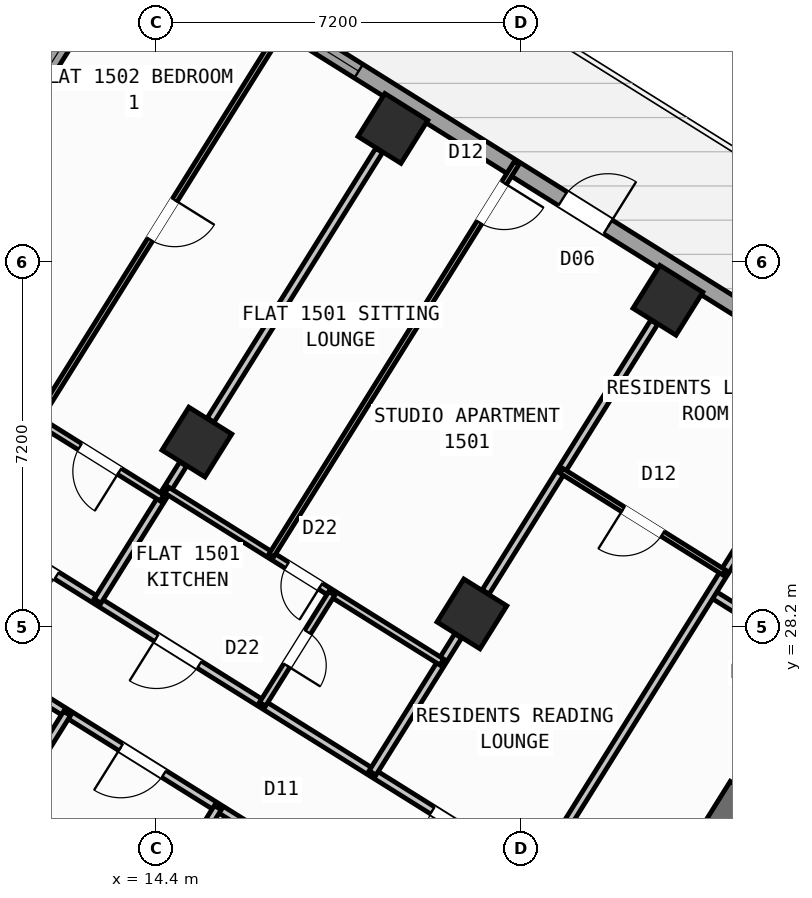
"""IFC4 building model, lengths in metres.
Left out: names, types, materials, properties, quantities, classifications, styles, units other than length and angle.
Written with IfcOpenShell. Run it as: python <this file> out.ifc"""

import sys

from ifc_helpers import new_model, si_unit, direction, frame, frame_2d, origin, origin_2d, place, context, subcontext, project, spatial, rectangle, hollow_rectangle, extrude, source, transform, mapped, element, fill, save


model = new_model("IFC4")
c1 = context("Model", 3, precision=1e-05, world=origin(), true_north=direction((0.0, 1.0)))
c2 = subcontext(c1, "Body", "Model", "MODEL_VIEW")
j1 = project(units=[si_unit("LENGTHUNIT", "METRE"), si_unit("PLANEANGLEUNIT", "RADIAN")], contexts=[c1])
p1 = place(None, origin())
s1 = spatial("IfcSite", under=j1, at=p1, CompositionType="ELEMENT")
p2 = place(p1, origin())
s2 = spatial("IfcBuilding", under=s1, at=p2, CompositionType="ELEMENT")
p3 = place(p2, frame((0.0, 0.0, 60.0)))
s3 = spatial("IfcBuildingStorey", under=s2, at=p3, CompositionType="ELEMENT", Elevation=60.0)
p4 = place(p3, frame((26.007, 24.976, 0.0), z_axis=(0.0, 0.0, 1.0), x_axis=(-0.529916319127, -0.848049936456, 0.0)))
e1 = element("IfcWall", 1, at=p4, inside=s3, PredefinedType="SHEAR", context=c2, shape_type="SweptSolid", body=[
    extrude(rectangle(XDim=6.375, YDim=0.65, at=frame_2d((3.188, 0.0))), origin(), (0.0, 0.0, 1.0), 3.35),
])
m1 = source(origin(), c2, "Body", "SweptSolid", [
    extrude(hollow_rectangle(XDim=1.0, YDim=1.0, WallThickness=0.04, at=origin_2d()), origin(), (0.0, 0.0, 1.0), 3.6),
])
for number, where, z_axis, x_axis in (
    (2, (24.5, 34.643, 0.0), (0.0, 0.0, 1.0), (-0.848, 0.53, 0.0)),
    (3, (20.632, 28.452, 0.0), (0.0, 0.0, 1.0), (-0.848, 0.53, 0.0)),
    (4, (19.073, 38.034, 0.0), (0.0, 0.0, 1.0), (-0.848, 0.53, 0.0)),
    (5, (15.205, 31.844, 0.0), (0.0, 0.0, 1.0), (-0.848, 0.53, 0.0)),
):
    element("IfcColumn", number, at=place(p3, frame(where, z_axis=z_axis, x_axis=x_axis)), inside=s3, PredefinedType="COLUMN", context=c2, shape_type="MappedRepresentation", body=[
        mapped(m1, transform((0.0, 0.0, 0.0), scale=1.0)),
    ])
p5 = place(p3, frame((2.415, 23.452, 0.0), z_axis=(0.0, 0.0, 1.0), x_axis=(0.52991049553, 0.848053575387, 0.0)))
e6 = element("IfcWall", 6, at=p5, inside=s3, PredefinedType="STANDARD", context=c2, shape_type="SweptSolid", body=[
    extrude(rectangle(XDim=21.587, YDim=0.32, at=frame_2d((10.794, 0.0))), origin(), (0.0, 0.0, 1.0), 2.725),
])
p6 = place(p5, frame((2.356, 0.0, 0.8)))
e7 = element("IfcOpeningElement", 7, at=p6, cuts=e6, PredefinedType="OPENING", context=c2, shape_type="SweptSolid", body=[
    extrude(rectangle(XDim=2.1, YDim=1.55, at=frame_2d((1.05, 0.775))), frame((0.0, 0.17, 0.0), z_axis=(0.0, -1.0, 0.0), x_axis=(1.0, 0.0, 0.0)), (0.0, 0.0, 1.0), 0.34),
])
p7 = place(p5, frame((10.949, 0.0, 1.0)))
e8 = element("IfcOpeningElement", 8, at=p7, cuts=e6, PredefinedType="OPENING", context=c2, shape_type="SweptSolid", body=[
    extrude(rectangle(XDim=0.9, YDim=1.25, at=frame_2d((0.45, 0.625))), frame((0.0, 0.17, 0.0), z_axis=(0.0, -1.0, 0.0), x_axis=(1.0, 0.0, 0.0)), (0.0, 0.0, 1.0), 0.34),
])
p8 = place(p5, frame((15.394, 0.0, 0.85)))
e9 = element("IfcOpeningElement", 9, at=p8, cuts=e6, PredefinedType="OPENING", context=c2, shape_type="SweptSolid", body=[
    extrude(rectangle(XDim=1.5, YDim=1.5, at=frame_2d((0.75, 0.75))), frame((0.0, 0.17, 0.0), z_axis=(0.0, -1.0, 0.0), x_axis=(1.0, 0.0, 0.0)), (0.0, 0.0, 1.0), 0.34),
])
p9 = place(p5, frame((18.194, 0.0, 0.85)))
e10 = element("IfcOpeningElement", 10, at=p9, cuts=e6, PredefinedType="OPENING", context=c2, shape_type="SweptSolid", body=[
    extrude(rectangle(XDim=1.5, YDim=1.5, at=frame_2d((0.75, 0.75))), frame((0.0, 0.17, 0.0), z_axis=(0.0, -1.0, 0.0), x_axis=(1.0, 0.0, 0.0)), (0.0, 0.0, 1.0), 0.34),
])
p10 = place(p3, frame((14.138, 41.825, 0.0), z_axis=(0.0, 0.0, 1.0), x_axis=(0.848046498049, -0.529921821731, 0.0)))
e11 = element("IfcWall", 11, at=p10, inside=s3, PredefinedType="STANDARD", context=c2, shape_type="SweptSolid", body=[
    extrude(rectangle(XDim=31.588, YDim=0.32, at=frame_2d((15.794, 0.0))), origin(), (0.0, 0.0, 1.0), 3.35),
])
p11 = place(p10, frame((9.772, 0.0, 0.0)))
e12 = element("IfcOpeningElement", 12, at=p11, cuts=e11, PredefinedType="OPENING", context=c2, shape_type="SweptSolid", body=[
    extrude(rectangle(XDim=1.05, YDim=2.15, at=frame_2d((0.525, 1.075))), frame((0.0, 0.17, 0.0), z_axis=(0.0, -1.0, 0.0), x_axis=(1.0, 0.0, 0.0)), (0.0, 0.0, 1.0), 0.34),
])
p12 = place(p10, frame((0.966, 0.0, 0.85)))
e13 = element("IfcOpeningElement", 13, at=p12, cuts=e11, PredefinedType="OPENING", context=c2, shape_type="SweptSolid", body=[
    extrude(rectangle(XDim=1.5, YDim=1.5, at=frame_2d((0.75, 0.75))), frame((0.0, 0.17, 0.0), z_axis=(0.0, -1.0, 0.0), x_axis=(1.0, 0.0, 0.0)), (0.0, 0.0, 1.0), 0.34),
])
p13 = place(p10, frame((4.121, 0.0, 1.0)))
e14 = element("IfcOpeningElement", 14, at=p13, cuts=e11, PredefinedType="OPENING", context=c2, shape_type="SweptSolid", body=[
    extrude(rectangle(XDim=0.9, YDim=1.25, at=frame_2d((0.45, 0.625))), frame((0.0, 0.17, 0.0), z_axis=(0.0, -1.0, 0.0), x_axis=(1.0, 0.0, 0.0)), (0.0, 0.0, 1.0), 0.34),
])
p14 = place(p10, frame((13.899, 0.0, 0.85)))
e15 = element("IfcOpeningElement", 15, at=p14, cuts=e11, PredefinedType="OPENING", context=c2, shape_type="SweptSolid", body=[
    extrude(rectangle(XDim=1.5, YDim=1.5, at=frame_2d((0.75, 0.75))), frame((0.0, 0.17, 0.0), z_axis=(0.0, -1.0, 0.0), x_axis=(1.0, 0.0, 0.0)), (0.0, 0.0, 1.0), 0.34),
])
p15 = place(p10, frame((22.019, 0.0, 0.95)))
e16 = element("IfcOpeningElement", 16, at=p15, cuts=e11, PredefinedType="OPENING", context=c2, shape_type="SweptSolid", body=[
    extrude(rectangle(XDim=1.2, YDim=1.4, at=frame_2d((0.6, 0.7))), frame((0.0, 0.17, 0.0), z_axis=(0.0, -1.0, 0.0), x_axis=(1.0, 0.0, 0.0)), (0.0, 0.0, 1.0), 0.34),
])
p16 = place(p10, frame((27.569, 0.0, 0.95)))
e17 = element("IfcOpeningElement", 17, at=p16, cuts=e11, PredefinedType="OPENING", context=c2, shape_type="SweptSolid", body=[
    extrude(rectangle(XDim=1.2, YDim=1.4, at=frame_2d((0.6, 0.7))), frame((0.0, 0.17, 0.0), z_axis=(0.0, -1.0, 0.0), x_axis=(1.0, 0.0, 0.0)), (0.0, 0.0, 1.0), 0.34),
])
p17 = place(p3, frame((27.57, 27.478, 0.0), z_axis=(0.0, 0.0, 1.0), x_axis=(-0.848050851465, 0.529914854792, 0.0)))
e18 = element("IfcWall", 18, at=p17, inside=s3, PredefinedType="PARTITIONING", context=c2, shape_type="SweptSolid", body=[
    extrude(rectangle(XDim=2.61, YDim=0.16, at=frame_2d((1.305, 0.0))), origin(), (0.0, 0.0, 1.0), 3.34),
])
p18 = place(p17, frame((0.95, 0.0, 0.0)))
e19 = element("IfcOpeningElement", 19, at=p18, cuts=e18, PredefinedType="OPENING", context=c2, shape_type="SweptSolid", body=[
    extrude(rectangle(XDim=0.86, YDim=2.05, at=frame_2d((0.43, 1.025))), frame((0.0, 0.09, 0.0), z_axis=(0.0, -1.0, 0.0), x_axis=(1.0, 0.0, 0.0)), (0.0, 0.0, 1.0), 0.18),
])
p19 = place(p3, frame((27.953, 33.016, 0.0), z_axis=(0.0, 0.0, 1.0), x_axis=(-0.529905022231, -0.848056995381, 0.0)))
e20 = element("IfcWall", 20, at=p19, inside=s3, PredefinedType="PARTITIONING", context=c2, shape_type="SweptSolid", body=[
    extrude(rectangle(XDim=11.45, YDim=0.16, at=frame_2d((5.725, 0.0))), origin(), (0.0, 0.0, 1.0), 3.34),
])
p20 = place(p3, frame((21.885, 23.306, 0.0), z_axis=(0.0, 0.0, 1.0), x_axis=(-0.848052408131, 0.529912363569, 0.0)))
e21 = element("IfcWall", 21, at=p20, inside=s3, PredefinedType="PARTITIONING", context=c2, shape_type="SweptSolid", body=[
    extrude(rectangle(XDim=16.73, YDim=0.16, at=frame_2d((8.365, 0.0))), origin(), (0.0, 0.0, 1.0), 3.34),
])
p21 = place(p20, frame((1.395, 0.0, 0.0)))
e22 = element("IfcOpeningElement", 22, at=p21, cuts=e21, PredefinedType="OPENING", context=c2, shape_type="SweptSolid", body=[
    extrude(rectangle(XDim=1.0, YDim=2.1, at=frame_2d((0.5, 1.05))), frame((0.0, 0.09, 0.0), z_axis=(0.0, -1.0, 0.0), x_axis=(1.0, 0.0, 0.0)), (0.0, 0.0, 1.0), 0.18),
])
p22 = place(p20, frame((7.82, 0.0, 0.0)))
e23 = element("IfcOpeningElement", 23, at=p22, cuts=e21, PredefinedType="OPENING", context=c2, shape_type="SweptSolid", body=[
    extrude(rectangle(XDim=1.0, YDim=2.1, at=frame_2d((0.5, 1.05))), frame((0.0, 0.09, 0.0), z_axis=(0.0, -1.0, 0.0), x_axis=(1.0, 0.0, 0.0)), (0.0, 0.0, 1.0), 0.18),
])
p23 = place(p20, frame((11.14, 0.0, 0.0)))
e24 = element("IfcOpeningElement", 24, at=p23, cuts=e21, PredefinedType="OPENING", context=c2, shape_type="SweptSolid", body=[
    extrude(rectangle(XDim=1.0, YDim=2.1, at=frame_2d((0.5, 1.05))), frame((0.0, 0.09, 0.0), z_axis=(0.0, -1.0, 0.0), x_axis=(1.0, 0.0, 0.0)), (0.0, 0.0, 1.0), 0.18),
])
p24 = place(p3, frame((20.719, 21.44, 0.0), z_axis=(0.0, 0.0, 1.0), x_axis=(-0.848048310262, 0.529918921593, 0.0)))
e25 = element("IfcWall", 25, at=p24, inside=s3, PredefinedType="PARTITIONING", context=c2, shape_type="SweptSolid", body=[
    extrude(rectangle(XDim=16.73, YDim=0.16, at=frame_2d((8.365, 0.0))), origin(), (0.0, 0.0, 1.0), 3.34),
])
p25 = place(p24, frame((0.92, 0.0, 0.0)))
e26 = element("IfcOpeningElement", 26, at=p25, cuts=e25, PredefinedType="OPENING", context=c2, shape_type="SweptSolid", body=[
    extrude(rectangle(XDim=1.0, YDim=2.1, at=frame_2d((0.5, 1.05))), frame((0.0, 0.09, 0.0), z_axis=(0.0, -1.0, 0.0), x_axis=(1.0, 0.0, 0.0)), (0.0, 0.0, 1.0), 0.18),
])
p26 = place(p24, frame((4.408, 0.0, 0.0)))
e27 = element("IfcOpeningElement", 27, at=p26, cuts=e25, PredefinedType="OPENING", context=c2, shape_type="SweptSolid", body=[
    extrude(rectangle(XDim=1.0, YDim=2.1, at=frame_2d((0.5, 1.05))), frame((0.0, 0.09, 0.0), z_axis=(0.0, -1.0, 0.0), x_axis=(1.0, 0.0, 0.0)), (0.0, 0.0, 1.0), 0.18),
])
p27 = place(p24, frame((7.271, 0.0, 0.0)))
e28 = element("IfcOpeningElement", 28, at=p27, cuts=e25, PredefinedType="OPENING", context=c2, shape_type="SweptSolid", body=[
    extrude(rectangle(XDim=1.0, YDim=2.1, at=frame_2d((0.5, 1.05))), frame((0.0, 0.09, 0.0), z_axis=(0.0, -1.0, 0.0), x_axis=(1.0, 0.0, 0.0)), (0.0, 0.0, 1.0), 0.18),
])
p28 = place(p24, frame((10.78, 0.0, 0.0)))
e29 = element("IfcOpeningElement", 29, at=p28, cuts=e25, PredefinedType="OPENING", context=c2, shape_type="SweptSolid", body=[
    extrude(rectangle(XDim=1.0, YDim=2.1, at=frame_2d((0.5, 1.05))), frame((0.0, 0.09, 0.0), z_axis=(0.0, -1.0, 0.0), x_axis=(1.0, 0.0, 0.0)), (0.0, 0.0, 1.0), 0.18),
])
p29 = place(p24, frame((14.372, 0.0, 0.0)))
e30 = element("IfcOpeningElement", 30, at=p29, cuts=e25, PredefinedType="OPENING", context=c2, shape_type="SweptSolid", body=[
    extrude(rectangle(XDim=1.0, YDim=2.1, at=frame_2d((0.5, 1.05))), frame((0.0, 0.09, 0.0), z_axis=(0.0, -1.0, 0.0), x_axis=(1.0, 0.0, 0.0)), (0.0, 0.0, 1.0), 0.18),
])
p30 = place(p3, frame((15.618, 24.628, 0.0), z_axis=(0.0, 0.0, 1.0), x_axis=(-0.529928058306, -0.848042600947, 0.0)))
e31 = element("IfcWall", 31, at=p30, inside=s3, PredefinedType="PARTITIONING", context=c2, shape_type="SweptSolid", body=[
    extrude(rectangle(XDim=8.05, YDim=0.16, at=frame_2d((4.025, 0.0))), origin(), (0.0, 0.0, 1.0), 2.995),
])
p31 = place(p3, frame((12.642, 26.488, 0.0), z_axis=(0.0, 0.0, 1.0), x_axis=(-0.529914428959, -0.848051117552, 0.0)))
e32 = element("IfcWall", 32, at=p31, inside=s3, PredefinedType="PARTITIONING", context=c2, shape_type="SweptSolid", body=[
    extrude(rectangle(XDim=8.05, YDim=0.16, at=frame_2d((4.025, 0.0))), origin(), (0.0, 0.0, 1.0), 3.34),
])
p32 = place(p3, frame((24.229, 34.209, 0.0), z_axis=(0.0, 0.0, 1.0), x_axis=(-0.529897533635, -0.848061674554, 0.0)))
e33 = element("IfcWall", 33, at=p32, inside=s3, PredefinedType="PARTITIONING", context=c2, shape_type="SweptSolid", body=[
    extrude(rectangle(XDim=6.276, YDim=0.16, at=frame_2d((3.138, 0.0))), origin(), (0.0, 0.0, 1.0), 2.725),
])
p33 = place(p3, frame((20.361, 28.018, 0.0), z_axis=(0.0, 0.0, 1.0), x_axis=(-0.529875025416, -0.848075738033, 0.0)))
e34 = element("IfcWall", 34, at=p33, inside=s3, PredefinedType="PARTITIONING", context=c2, shape_type="SweptSolid", body=[
    extrude(rectangle(XDim=3.188, YDim=0.16, at=frame_2d((1.594, 0.0))), origin(), (0.0, 0.0, 1.0), 2.725),
])
p34 = place(p3, frame((25.612, 29.269, 0.0), z_axis=(0.0, 0.0, 1.0), x_axis=(-0.84803087207, 0.529946827537, 0.0)))
e35 = element("IfcWall", 35, at=p34, inside=s3, PredefinedType="PARTITIONING", context=c2, shape_type="SweptSolid", body=[
    extrude(rectangle(XDim=3.79, YDim=0.11, at=frame_2d((1.895, 0.0))), origin(), (0.0, 0.0, 1.0), 3.34),
])
p35 = place(p34, frame((1.435, 0.0, 0.0)))
e36 = element("IfcOpeningElement", 36, at=p35, cuts=e35, PredefinedType="OPENING", context=c2, shape_type="SweptSolid", body=[
    extrude(rectangle(XDim=0.92, YDim=2.08, at=frame_2d((0.46, 1.04))), frame((0.0, 0.065, 0.0), z_axis=(0.0, -1.0, 0.0), x_axis=(1.0, 0.0, 0.0)), (0.0, 0.0, 1.0), 0.13),
])
p36 = place(p3, frame((18.802, 37.6, 0.0), z_axis=(0.0, 0.0, 1.0), x_axis=(-0.529915015264, -0.848050751193, 0.0)))
e37 = element("IfcWall", 37, at=p36, inside=s3, PredefinedType="PARTITIONING", context=c2, shape_type="SweptSolid", body=[
    extrude(rectangle(XDim=6.276, YDim=0.16, at=frame_2d((3.138, 0.0))), origin(), (0.0, 0.0, 1.0), 2.725),
])
p37 = place(p3, frame((14.933, 31.409, 0.0), z_axis=(0.0, 0.0, 1.0), x_axis=(-0.529875025416, -0.848075738033, 0.0)))
e38 = element("IfcWall", 38, at=p37, inside=s3, PredefinedType="PARTITIONING", context=c2, shape_type="SweptSolid", body=[
    extrude(rectangle(XDim=3.188, YDim=0.16, at=frame_2d((1.594, 0.0))), origin(), (0.0, 0.0, 1.0), 2.725),
])
p38 = place(p3, frame((20.039, 27.502, 0.0), z_axis=(0.0, 0.0, 1.0), x_axis=(-0.848039019877, 0.529933789039, 0.0)))
e39 = element("IfcWall", 39, at=p38, inside=s3, PredefinedType="PLUMBINGWALL", context=c2, shape_type="SweptSolid", body=[
    extrude(rectangle(XDim=6.4, YDim=0.14, at=frame_2d((3.2, 0.0))), origin(), (0.0, 0.0, 1.0), 3.34),
])
p39 = place(p38, frame((2.824, 0.0, 0.0)))
e40 = element("IfcOpeningElement", 40, at=p39, cuts=e39, PredefinedType="OPENING", context=c2, shape_type="SweptSolid", body=[
    extrude(rectangle(XDim=0.78, YDim=2.05, at=frame_2d((0.39, 1.025))), frame((0.0, 0.08, 0.0), z_axis=(0.0, -1.0, 0.0), x_axis=(1.0, 0.0, 0.0)), (0.0, 0.0, 1.0), 0.16),
])
p40 = place(p3, frame((17.867, 28.859, 0.0), z_axis=(0.0, 0.0, 1.0), x_axis=(-0.529913878929, -0.848051461244, 0.0)))
e41 = element("IfcWall", 41, at=p40, inside=s3, PredefinedType="PLUMBINGWALL", context=c2, shape_type="SweptSolid", body=[
    extrude(rectangle(XDim=2.58, YDim=0.14, at=frame_2d((1.29, 0.0))), origin(), (0.0, 0.0, 1.0), 3.34),
])
p41 = place(p40, frame((0.9, 0.0, 0.0)))
e42 = element("IfcOpeningElement", 42, at=p41, cuts=e41, PredefinedType="OPENING", context=c2, shape_type="SweptSolid", body=[
    extrude(rectangle(XDim=0.78, YDim=2.05, at=frame_2d((0.39, 1.025))), frame((0.0, 0.08, 0.0), z_axis=(0.0, -1.0, 0.0), x_axis=(1.0, 0.0, 0.0)), (0.0, 0.0, 1.0), 0.16),
])
p42 = place(p3, frame((21.517, 37.356, 0.0), z_axis=(0.0, 0.0, 1.0), x_axis=(-0.529919705034, -0.848047820713, 0.0)))
e43 = element("IfcWall", 43, at=p42, inside=s3, PredefinedType="PARTITIONING", context=c2, shape_type="SweptSolid", body=[
    extrude(rectangle(XDim=9.14, YDim=0.11, at=frame_2d((4.57, 0.0))), origin(), (0.0, 0.0, 1.0), 3.34),
])
p43 = place(p42, frame((0.47, 0.0, 0.0)))
e44 = element("IfcOpeningElement", 44, at=p43, cuts=e43, PredefinedType="OPENING", context=c2, shape_type="SweptSolid", body=[
    extrude(rectangle(XDim=0.92, YDim=2.08, at=frame_2d((0.46, 1.04))), frame((0.0, 0.065, 0.0), z_axis=(0.0, -1.0, 0.0), x_axis=(1.0, 0.0, 0.0)), (0.0, 0.0, 1.0), 0.13),
])
p44 = place(p3, frame((16.995, 40.182, 0.0), z_axis=(0.0, 0.0, 1.0), x_axis=(-0.529927783988, -0.848042772363, 0.0)))
e45 = element("IfcWall", 45, at=p44, inside=s3, PredefinedType="PARTITIONING", context=c2, shape_type="SweptSolid", body=[
    extrude(rectangle(XDim=11.72, YDim=0.11, at=frame_2d((5.86, 0.0))), origin(), (0.0, 0.0, 1.0), 3.34),
])
p45 = place(p44, frame((10.08, 0.0, 0.0)))
e46 = element("IfcOpeningElement", 46, at=p45, cuts=e45, PredefinedType="OPENING", context=c2, shape_type="SweptSolid", body=[
    extrude(rectangle(XDim=0.78, YDim=2.05, at=frame_2d((0.39, 1.025))), frame((0.0, 0.065, 0.0), z_axis=(0.0, -1.0, 0.0), x_axis=(1.0, 0.0, 0.0)), (0.0, 0.0, 1.0), 0.13),
])
p46 = place(p44, frame((4.2, 0.0, 0.0)))
e47 = element("IfcOpeningElement", 47, at=p46, cuts=e45, PredefinedType="OPENING", context=c2, shape_type="SweptSolid", body=[
    extrude(rectangle(XDim=0.92, YDim=2.08, at=frame_2d((0.46, 1.04))), frame((0.0, 0.065, 0.0), z_axis=(0.0, -1.0, 0.0), x_axis=(1.0, 0.0, 0.0)), (0.0, 0.0, 1.0), 0.13),
])
p47 = place(p3, frame((14.516, 30.741, 0.0), z_axis=(0.0, 0.0, 1.0), x_axis=(-0.848059786386, 0.529900555496, 0.0)))
e48 = element("IfcWall", 48, at=p47, inside=s3, PredefinedType="PLUMBINGWALL", context=c2, shape_type="SweptSolid", body=[
    extrude(rectangle(XDim=2.9, YDim=0.14, at=frame_2d((1.45, 0.0))), origin(), (0.0, 0.0, 1.0), 3.34),
])
p48 = place(p47, frame((0.99, 0.0, 0.0)))
e49 = element("IfcOpeningElement", 49, at=p48, cuts=e48, PredefinedType="OPENING", context=c2, shape_type="SweptSolid", body=[
    extrude(rectangle(XDim=0.92, YDim=2.08, at=frame_2d((0.46, 1.04))), frame((0.0, 0.08, 0.0), z_axis=(0.0, -1.0, 0.0), x_axis=(1.0, 0.0, 0.0)), (0.0, 0.0, 1.0), 0.16),
])
m2 = source(origin(), c2, "Body", "SweptSolid", [
    extrude(rectangle(XDim=1.05, YDim=2.15, at=frame_2d((0.525, 1.075))), frame((0.0, 0.025, 0.0), z_axis=(0.0, -1.0, 0.0), x_axis=(1.0, 0.0, 0.0)), (0.0, 0.0, 1.0), 0.05),
])
p49 = place(p11, origin())
e50 = element("IfcDoor", 50, at=p49, inside=s3, OperationType="SINGLE_SWING_RIGHT", PredefinedType="DOOR", context=c2, shape_type="MappedRepresentation", body=[
    mapped(m2, transform((0.0, 0.0, 0.0), scale=1.0)),
])
fill(e12, e50)
m3 = source(origin(), c2, "Body", "SweptSolid", [
    extrude(rectangle(XDim=1.5, YDim=1.5, at=frame_2d((0.75, 0.75))), frame((0.0, 0.03, 0.0), z_axis=(0.0, -1.0, 0.0), x_axis=(1.0, 0.0, 0.0)), (0.0, 0.0, 1.0), 0.06),
])
p50 = place(p9, origin())
e51 = element("IfcWindow", 51, at=p50, inside=s3, PartitioningType="SINGLE_PANEL", PredefinedType="WINDOW", context=c2, shape_type="MappedRepresentation", body=[
    mapped(m3, transform((0.0, 0.0, 0.0), scale=1.0)),
])
fill(e10, e51)
m4 = source(origin(), c2, "Body", "SweptSolid", [
    extrude(rectangle(XDim=0.9, YDim=1.25, at=frame_2d((0.45, 0.625))), frame((0.0, 0.03, 0.0), z_axis=(0.0, -1.0, 0.0), x_axis=(1.0, 0.0, 0.0)), (0.0, 0.0, 1.0), 0.06),
])
p51 = place(p13, origin())
e52 = element("IfcWindow", 52, at=p51, inside=s3, PartitioningType="SINGLE_PANEL", PredefinedType="WINDOW", context=c2, shape_type="MappedRepresentation", body=[
    mapped(m4, transform((0.0, 0.0, 0.0), scale=1.0)),
])
fill(e14, e52)
m5 = source(origin(), c2, "Body", "SweptSolid", [
    extrude(rectangle(XDim=1.0, YDim=2.1, at=frame_2d((0.5, 1.05))), frame((0.0, 0.025, 0.0), z_axis=(0.0, -1.0, 0.0), x_axis=(1.0, 0.0, 0.0)), (0.0, 0.0, 1.0), 0.05),
])
p52 = place(p27, origin())
e53 = element("IfcDoor", 53, at=p52, inside=s3, OperationType="SINGLE_SWING_RIGHT", PredefinedType="DOOR", context=c2, shape_type="MappedRepresentation", body=[
    mapped(m5, transform((0.0, 0.0, 0.0), scale=1.0)),
])
fill(e28, e53)
p53 = place(p21, origin())
e54 = element("IfcDoor", 54, at=p53, inside=s3, OperationType="SINGLE_SWING_LEFT", PredefinedType="DOOR", context=c2, shape_type="MappedRepresentation", body=[
    mapped(m5, transform((0.0, 0.0, 0.0), scale=1.0)),
])
fill(e22, e54)
m6 = source(origin(), c2, "Body", "SweptSolid", [
    extrude(rectangle(XDim=0.92, YDim=2.08, at=frame_2d((0.46, 1.04))), frame((0.0, 0.025, 0.0), z_axis=(0.0, -1.0, 0.0), x_axis=(1.0, 0.0, 0.0)), (0.0, 0.0, 1.0), 0.05),
])
p54 = place(p35, origin())
e55 = element("IfcDoor", 55, at=p54, inside=s3, OperationType="SINGLE_SWING_RIGHT", PredefinedType="DOOR", context=c2, shape_type="MappedRepresentation", body=[
    mapped(m6, transform((0.0, 0.0, 0.0), scale=1.0)),
])
fill(e36, e55)
p55 = place(p43, origin())
e56 = element("IfcDoor", 56, at=p55, inside=s3, OperationType="SINGLE_SWING_LEFT", PredefinedType="DOOR", context=c2, shape_type="MappedRepresentation", body=[
    mapped(m6, transform((0.0, 0.0, 0.0), scale=1.0)),
])
fill(e44, e56)
p56 = place(p22, origin())
e57 = element("IfcDoor", 57, at=p56, inside=s3, OperationType="SINGLE_SWING_RIGHT", PredefinedType="DOOR", context=c2, shape_type="MappedRepresentation", body=[
    mapped(m5, transform((0.0, 0.0, 0.0), scale=1.0)),
])
fill(e23, e57)
m7 = source(origin(), c2, "Body", "SweptSolid", [
    extrude(rectangle(XDim=0.78, YDim=2.05, at=frame_2d((0.39, 1.025))), frame((0.0, 0.025, 0.0), z_axis=(0.0, -1.0, 0.0), x_axis=(1.0, 0.0, 0.0)), (0.0, 0.0, 1.0), 0.05),
])
p57 = place(p39, origin())
e58 = element("IfcDoor", 58, at=p57, inside=s3, OperationType="SINGLE_SWING_LEFT", PredefinedType="DOOR", context=c2, shape_type="MappedRepresentation", body=[
    mapped(m7, transform((0.0, 0.0, 0.0), scale=1.0)),
])
fill(e40, e58)
p58 = place(p41, origin())
e59 = element("IfcDoor", 59, at=p58, inside=s3, OperationType="SINGLE_SWING_RIGHT", PredefinedType="DOOR", context=c2, shape_type="MappedRepresentation", body=[
    mapped(m7, transform((0.0, 0.0, 0.0), scale=1.0)),
])
fill(e42, e59)
p59 = place(p23, origin())
e60 = element("IfcDoor", 60, at=p59, inside=s3, OperationType="SINGLE_SWING_RIGHT", PredefinedType="DOOR", context=c2, shape_type="MappedRepresentation", body=[
    mapped(m5, transform((0.0, 0.0, 0.0), scale=1.0)),
])
fill(e24, e60)
p60 = place(p48, origin())
e61 = element("IfcDoor", 61, at=p60, inside=s3, OperationType="SINGLE_SWING_LEFT", PredefinedType="DOOR", context=c2, shape_type="MappedRepresentation", body=[
    mapped(m6, transform((0.0, 0.0, 0.0), scale=1.0)),
])
fill(e49, e61)
p61 = place(p46, origin())
e62 = element("IfcDoor", 62, at=p61, inside=s3, OperationType="SINGLE_SWING_LEFT", PredefinedType="DOOR", context=c2, shape_type="MappedRepresentation", body=[
    mapped(m6, transform((0.0, 0.0, 0.0), scale=1.0)),
])
fill(e47, e62)
save(model, sys.argv[1])
